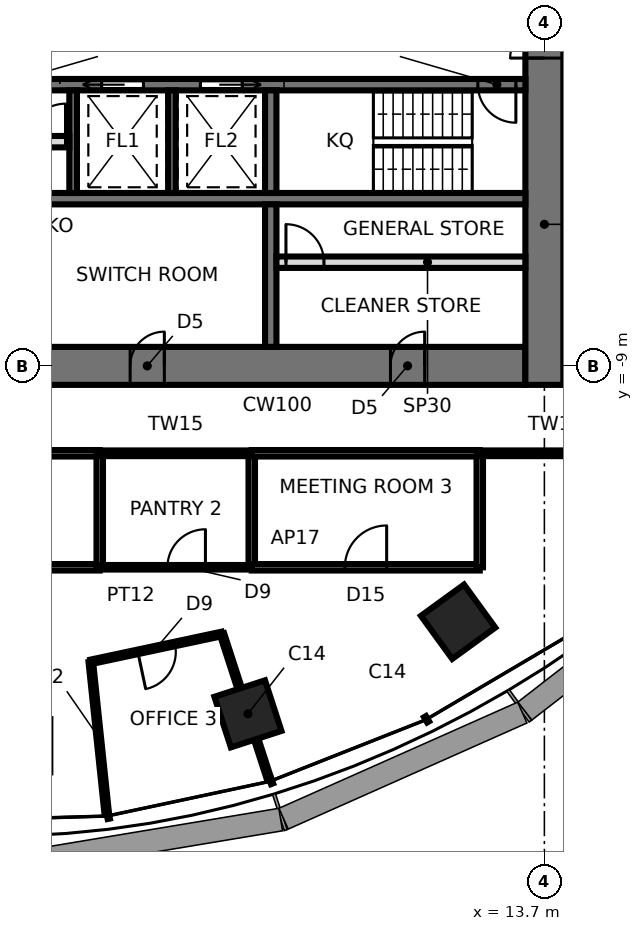
"""IFC4 building model, lengths in metres.
Left out: names, types, materials, properties, quantities, classifications, styles, units other than length and angle.
Written with IfcOpenShell. Run it as: python <this file> out.ifc"""

import sys

from ifc_helpers import new_model, si_unit, direction, frame, frame_2d, origin, origin_2d, place, context, subcontext, project, spatial, rectangle, extrude, element, fill, save


model = new_model("IFC4")
c1 = context("Model", 3, precision=1e-05, world=origin(), true_north=direction((0.0, 1.0)))
c2 = subcontext(c1, "Body", "Model", "MODEL_VIEW")
j1 = project(units=[si_unit("LENGTHUNIT", "METRE"), si_unit("PLANEANGLEUNIT", "RADIAN")], contexts=[c1])
p1 = place(None, origin())
s1 = spatial("IfcSite", under=j1, at=p1, CompositionType="ELEMENT")
p2 = place(p1, origin())
s2 = spatial("IfcBuilding", under=s1, at=p2, CompositionType="ELEMENT")
p3 = place(p2, frame((0.0, 0.0, 226.7)))
s3 = spatial("IfcBuildingStorey", under=s2, at=p3, CompositionType="ELEMENT", Elevation=226.7)
for number, where, z_axis, x_axis in (
    (1, (5.9, -18.157, 0.0), (0.0, 0.0, 1.0), (0.309, -0.951, 0.0)),
    (2, (11.43, -15.733, 0.0), (0.0, 0.0, 1.0), (0.588, -0.809, 0.0)),
):
    element("IfcColumn", number, at=place(p3, frame(where, z_axis=z_axis, x_axis=x_axis)), inside=s3, PredefinedType="COLUMN", context=c2, shape_type="SweptSolid", body=[
        extrude(rectangle(XDim=1.4, YDim=1.4, at=origin_2d()), origin(), (0.0, 0.0, 1.0), 3.9),
    ])
p4 = place(p3, frame((-13.2, -9.0, 0.0), z_axis=(0.0, 0.0, 1.0), x_axis=(1.0, 0.0, 0.0)))
e3 = element("IfcWall", 3, at=p4, inside=s3, PredefinedType="SHEAR", context=c2, shape_type="SweptSolid", body=[
    extrude(rectangle(XDim=26.4, YDim=1.0, at=frame_2d((13.2, 0.0))), origin(), (0.0, 0.0, 1.0), 3.9),
])
p5 = place(p4, frame((2.65, 0.0, 0.0)))
e4 = element("IfcOpeningElement", 4, at=p5, cuts=e3, PredefinedType="OPENING", context=c2, shape_type="SweptSolid", body=[
    extrude(rectangle(XDim=0.9, YDim=2.1, at=frame_2d((0.45, 1.05))), frame((0.0, 0.51, 0.0), z_axis=(0.0, -1.0, 0.0), x_axis=(1.0, 0.0, 0.0)), (0.0, 0.0, 1.0), 1.02),
])
p6 = place(p4, frame((9.5, 0.0, 0.0)))
e5 = element("IfcOpeningElement", 5, at=p6, cuts=e3, PredefinedType="OPENING", context=c2, shape_type="SweptSolid", body=[
    extrude(rectangle(XDim=0.9, YDim=2.1, at=frame_2d((0.45, 1.05))), frame((0.0, 0.51, 0.0), z_axis=(0.0, -1.0, 0.0), x_axis=(1.0, 0.0, 0.0)), (0.0, 0.0, 1.0), 1.02),
])
p7 = place(p4, frame((16.0, 0.0, 0.0)))
e6 = element("IfcOpeningElement", 6, at=p7, cuts=e3, PredefinedType="OPENING", context=c2, shape_type="SweptSolid", body=[
    extrude(rectangle(XDim=0.9, YDim=2.1, at=frame_2d((0.45, 1.05))), frame((0.0, 0.51, 0.0), z_axis=(0.0, -1.0, 0.0), x_axis=(1.0, 0.0, 0.0)), (0.0, 0.0, 1.0), 1.02),
])
p8 = place(p4, frame((22.85, 0.0, 0.0)))
e7 = element("IfcOpeningElement", 7, at=p8, cuts=e3, PredefinedType="OPENING", context=c2, shape_type="SweptSolid", body=[
    extrude(rectangle(XDim=0.9, YDim=2.1, at=frame_2d((0.45, 1.05))), frame((0.0, 0.51, 0.0), z_axis=(0.0, -1.0, 0.0), x_axis=(1.0, 0.0, 0.0)), (0.0, 0.0, 1.0), 1.02),
])
p9 = place(p3, frame((13.7, -9.5, 0.0), z_axis=(0.0, 0.0, 1.0), x_axis=(0.0, 1.0, 0.0)))
e8 = element("IfcWall", 8, at=p9, inside=s3, PredefinedType="SHEAR", context=c2, shape_type="SweptSolid", body=[
    extrude(rectangle(XDim=19.0, YDim=1.0, at=frame_2d((9.5, 0.0))), origin(), (0.0, 0.0, 1.0), 3.9),
])
p10 = place(p9, frame((8.6, 0.0, 0.0)))
e9 = element("IfcOpeningElement", 9, at=p10, cuts=e8, PredefinedType="OPENING", context=c2, shape_type="SweptSolid", body=[
    extrude(rectangle(XDim=1.8, YDim=2.4, at=frame_2d((0.9, 1.2))), frame((0.0, 0.51, 0.0), z_axis=(0.0, -1.0, 0.0), x_axis=(1.0, 0.0, 0.0)), (0.0, 0.0, 1.0), 1.02),
])
p11 = place(p3, frame((-13.2, -1.6, 0.0), z_axis=(0.0, 0.0, 1.0), x_axis=(1.0, 0.0, 0.0)))
e10 = element("IfcWall", 10, at=p11, inside=s3, PredefinedType="SHEAR", context=c2, shape_type="SweptSolid", body=[
    extrude(rectangle(XDim=26.4, YDim=0.3, at=frame_2d((13.2, 0.0))), origin(), (0.0, 0.0, 1.0), 3.9),
])
p12 = place(p11, frame((25.15, 0.0, 0.0)))
e11 = element("IfcOpeningElement", 11, at=p12, cuts=e10, PredefinedType="OPENING", context=c2, shape_type="SweptSolid", body=[
    extrude(rectangle(XDim=1.0, YDim=2.1, at=frame_2d((0.5, 1.05))), frame((0.0, 0.16, 0.0), z_axis=(0.0, -1.0, 0.0), x_axis=(1.0, 0.0, 0.0)), (0.0, 0.0, 1.0), 0.32),
])
p13 = place(p11, frame((6.95, 0.0, 0.0)))
e12 = element("IfcOpeningElement", 12, at=p13, cuts=e10, PredefinedType="OPENING", context=c2, shape_type="SweptSolid", body=[
    extrude(rectangle(XDim=0.9, YDim=2.1, at=frame_2d((0.45, 1.05))), frame((0.0, 0.16, 0.0), z_axis=(0.0, -1.0, 0.0), x_axis=(1.0, 0.0, 0.0)), (0.0, 0.0, 1.0), 0.32),
])
p14 = place(p11, frame((10.15, 0.0, 0.0)))
e13 = element("IfcOpeningElement", 13, at=p14, cuts=e10, PredefinedType="OPENING", context=c2, shape_type="SweptSolid", body=[
    extrude(rectangle(XDim=0.9, YDim=2.1, at=frame_2d((0.45, 1.05))), frame((0.0, 0.16, 0.0), z_axis=(0.0, -1.0, 0.0), x_axis=(1.0, 0.0, 0.0)), (0.0, 0.0, 1.0), 0.32),
])
p15 = place(p11, frame((12.15, 0.0, 0.0)))
e14 = element("IfcOpeningElement", 14, at=p15, cuts=e10, PredefinedType="OPENING", context=c2, shape_type="SweptSolid", body=[
    extrude(rectangle(XDim=0.9, YDim=2.1, at=frame_2d((0.45, 1.05))), frame((0.0, 0.16, 0.0), z_axis=(0.0, -1.0, 0.0), x_axis=(1.0, 0.0, 0.0)), (0.0, 0.0, 1.0), 0.32),
])
p16 = place(p11, frame((15.25, 0.0, 0.0)))
e15 = element("IfcOpeningElement", 15, at=p16, cuts=e10, PredefinedType="OPENING", context=c2, shape_type="SweptSolid", body=[
    extrude(rectangle(XDim=1.1, YDim=2.3, at=frame_2d((0.55, 1.15))), frame((0.0, 0.16, 0.0), z_axis=(0.0, -1.0, 0.0), x_axis=(1.0, 0.0, 0.0)), (0.0, 0.0, 1.0), 0.32),
])
p17 = place(p11, frame((17.85, 0.0, 0.0)))
e16 = element("IfcOpeningElement", 16, at=p17, cuts=e10, PredefinedType="OPENING", context=c2, shape_type="SweptSolid", body=[
    extrude(rectangle(XDim=1.1, YDim=2.3, at=frame_2d((0.55, 1.15))), frame((0.0, 0.16, 0.0), z_axis=(0.0, -1.0, 0.0), x_axis=(1.0, 0.0, 0.0)), (0.0, 0.0, 1.0), 0.32),
])
p18 = place(p11, frame((4.85, 0.0, 0.0)))
e17 = element("IfcOpeningElement", 17, at=p18, cuts=e10, PredefinedType="OPENING", context=c2, shape_type="SweptSolid", body=[
    extrude(rectangle(XDim=1.1, YDim=2.3, at=frame_2d((0.55, 1.15))), frame((0.0, 0.16, 0.0), z_axis=(0.0, -1.0, 0.0), x_axis=(1.0, 0.0, 0.0)), (0.0, 0.0, 1.0), 0.32),
])
p19 = place(p11, frame((2.25, 0.0, 0.0)))
e18 = element("IfcOpeningElement", 18, at=p19, cuts=e10, PredefinedType="OPENING", context=c2, shape_type="SweptSolid", body=[
    extrude(rectangle(XDim=1.1, YDim=2.3, at=frame_2d((0.55, 1.15))), frame((0.0, 0.16, 0.0), z_axis=(0.0, -1.0, 0.0), x_axis=(1.0, 0.0, 0.0)), (0.0, 0.0, 1.0), 0.32),
])
p20 = place(p11, frame((0.35, 0.0, 0.0)))
e19 = element("IfcOpeningElement", 19, at=p20, cuts=e10, PredefinedType="OPENING", context=c2, shape_type="SweptSolid", body=[
    extrude(rectangle(XDim=0.9, YDim=2.1, at=frame_2d((0.45, 1.05))), frame((0.0, 0.16, 0.0), z_axis=(0.0, -1.0, 0.0), x_axis=(1.0, 0.0, 0.0)), (0.0, 0.0, 1.0), 0.32),
])
p21 = place(p3, frame((-13.2, -4.6, 0.0), z_axis=(0.0, 0.0, 1.0), x_axis=(1.0, 0.0, 0.0)))
e20 = element("IfcWall", 20, at=p21, inside=s3, PredefinedType="SHEAR", context=c2, shape_type="SweptSolid", body=[
    extrude(rectangle(XDim=26.4, YDim=0.3, at=frame_2d((13.2, 0.0))), origin(), (0.0, 0.0, 1.0), 3.9),
])
p22 = place(p3, frame((6.5, -1.75, 0.0), z_axis=(0.0, 0.0, 1.0), x_axis=(0.0, -1.0, 0.0)))
e21 = element("IfcWall", 21, at=p22, inside=s3, PredefinedType="SHEAR", context=c2, shape_type="SweptSolid", body=[
    extrude(rectangle(XDim=2.7, YDim=0.3, at=frame_2d((1.35, 0.0))), origin(), (0.0, 0.0, 1.0), 3.9),
])
p23 = place(p3, frame((6.5, -4.75, 0.0), z_axis=(0.0, 0.0, 1.0), x_axis=(0.0, -1.0, 0.0)))
e22 = element("IfcWall", 22, at=p23, inside=s3, PredefinedType="SHEAR", context=c2, shape_type="SweptSolid", body=[
    extrude(rectangle(XDim=3.75, YDim=0.3, at=frame_2d((1.875, 0.0))), origin(), (0.0, 0.0, 1.0), 3.9),
])
for number, where, z_axis, x_axis in (
    (23, (1.3, -1.75, 0.0), (0.0, 0.0, 1.0), (0.0, -1.0, 0.0)),
    (24, (3.9, -1.75, 0.0), (0.0, 0.0, 1.0), (0.0, -1.0, 0.0)),
):
    element("IfcWall", number, at=place(p3, frame(where, z_axis=z_axis, x_axis=x_axis)), inside=s3, PredefinedType="SHEAR", context=c2, shape_type="SweptSolid", body=[
        extrude(rectangle(XDim=2.7, YDim=0.2, at=frame_2d((1.35, 0.0))), origin(), (0.0, 0.0, 1.0), 3.9),
    ])
p24 = place(p3, frame((-1.2, -3.1, 0.0), z_axis=(0.0, 0.0, 1.0), x_axis=(1.0, 0.0, 0.0)))
e25 = element("IfcWall", 25, at=p24, inside=s3, PredefinedType="PARTITIONING", context=c2, shape_type="SweptSolid", body=[
    extrude(rectangle(XDim=2.4, YDim=0.3, at=frame_2d((1.2, 0.0))), origin(), (0.0, 0.0, 1.0), 3.74),
])
p25 = place(p24, frame((1.3, 0.0, 0.0)))
e26 = element("IfcOpeningElement", 26, at=p25, cuts=e25, PredefinedType="OPENING", context=c2, shape_type="SweptSolid", body=[
    extrude(rectangle(XDim=1.0, YDim=2.4, at=frame_2d((0.5, 1.2))), frame((0.0, 0.16, 0.0), z_axis=(0.0, -1.0, 0.0), x_axis=(1.0, 0.0, 0.0)), (0.0, 0.0, 1.0), 0.32),
])
p26 = place(p3, frame((6.65, -6.272, 0.0), z_axis=(0.0, 0.0, 1.0), x_axis=(1.0, 0.0, 0.0)))
e27 = element("IfcWall", 27, at=p26, inside=s3, PredefinedType="PARTITIONING", context=c2, shape_type="SweptSolid", body=[
    extrude(rectangle(XDim=6.55, YDim=0.3, at=frame_2d((3.275, 0.0))), origin(), (0.0, 0.0, 1.0), 3.74),
])
p27 = place(p26, frame((0.25, 0.0, 0.0)))
e28 = element("IfcOpeningElement", 28, at=p27, cuts=e27, PredefinedType="OPENING", context=c2, shape_type="SweptSolid", body=[
    extrude(rectangle(XDim=1.0, YDim=2.4, at=frame_2d((0.5, 1.2))), frame((0.0, 0.16, 0.0), z_axis=(0.0, -1.0, 0.0), x_axis=(1.0, 0.0, 0.0)), (0.0, 0.0, 1.0), 0.32),
])
p28 = place(p3, frame((2.0, -11.3, 0.0), z_axis=(0.0, 0.0, 1.0), x_axis=(-1.0, 0.0, 0.0)))
e29 = element("IfcWall", 29, at=p28, inside=s3, PredefinedType="PARTITIONING", context=c2, shape_type="SweptSolid", body=[
    extrude(rectangle(XDim=8.0, YDim=0.17, at=frame_2d((4.0, 0.0))), origin(), (0.0, 0.0, 1.0), 3.74),
])
p29 = place(p3, frame((-6.0, -14.3, 0.0), z_axis=(0.0, 0.0, 1.0), x_axis=(1.0, 0.0, 0.0)))
e30 = element("IfcWall", 30, at=p29, inside=s3, PredefinedType="PARTITIONING", context=c2, shape_type="SweptSolid", body=[
    extrude(rectangle(XDim=8.0, YDim=0.17, at=frame_2d((4.0, 0.0))), origin(), (0.0, 0.0, 1.0), 3.74),
])
p30 = place(p29, frame((3.45, 0.0, 0.0)))
e31 = element("IfcOpeningElement", 31, at=p30, cuts=e30, PredefinedType="OPENING", context=c2, shape_type="SweptSolid", body=[
    extrude(rectangle(XDim=1.1, YDim=2.4, at=frame_2d((0.55, 1.2))), frame((0.0, 0.095, 0.0), z_axis=(0.0, -1.0, 0.0), x_axis=(1.0, 0.0, 0.0)), (0.0, 0.0, 1.0), 0.19),
])
p31 = place(p3, frame((1.765, -16.789, 0.0), z_axis=(0.0, 0.0, 1.0), x_axis=(0.104494148666, -0.99452550138, 0.0)))
e32 = element("IfcWall", 32, at=p31, inside=s3, PredefinedType="PARTITIONING", context=c2, shape_type="SweptSolid", body=[
    extrude(rectangle(XDim=4.0, YDim=0.12, at=frame_2d((2.0, 0.0))), origin(), (0.0, 0.0, 1.0), 3.74),
])
p32 = place(p3, frame((2.0, -11.3, 0.0), z_axis=(0.0, 0.0, 1.0), x_axis=(0.0, -1.0, 0.0)))
e33 = element("IfcWall", 33, at=p32, inside=s3, PredefinedType="PARTITIONING", context=c2, shape_type="SweptSolid", body=[
    extrude(rectangle(XDim=3.0, YDim=0.17, at=frame_2d((1.5, 0.0))), origin(), (0.0, 0.0, 1.0), 3.74),
])
p33 = place(p3, frame((5.216, -16.053, 0.0), z_axis=(0.0, 0.0, 1.0), x_axis=(-0.978033661385, -0.208447012927, 0.0)))
e34 = element("IfcWall", 34, at=p33, inside=s3, PredefinedType="PARTITIONING", context=c2, shape_type="SweptSolid", body=[
    extrude(rectangle(XDim=3.529, YDim=0.12, at=frame_2d((1.765, 0.0))), origin(), (0.0, 0.0, 1.0), 3.74),
])
p34 = place(p33, frame((1.264, 0.0, 0.0)))
e35 = element("IfcOpeningElement", 35, at=p34, cuts=e34, PredefinedType="OPENING", context=c2, shape_type="SweptSolid", body=[
    extrude(rectangle(XDim=1.0, YDim=2.4, at=frame_2d((0.5, 1.2))), frame((0.0, 0.07, 0.0), z_axis=(0.0, -1.0, 0.0), x_axis=(1.0, 0.0, 0.0)), (0.0, 0.0, 1.0), 0.14),
])
p35 = place(p3, frame((2.0, -14.3, 0.0), z_axis=(0.0, 0.0, 1.0), x_axis=(1.0, 0.0, 0.0)))
e36 = element("IfcWall", 36, at=p35, inside=s3, PredefinedType="PARTITIONING", context=c2, shape_type="SweptSolid", body=[
    extrude(rectangle(XDim=4.0, YDim=0.12, at=frame_2d((2.0, 0.0))), origin(), (0.0, 0.0, 1.0), 3.74),
])
p36 = place(p35, frame((1.781, 0.0, 0.0)))
e37 = element("IfcOpeningElement", 37, at=p36, cuts=e36, PredefinedType="OPENING", context=c2, shape_type="SweptSolid", body=[
    extrude(rectangle(XDim=1.0, YDim=2.4, at=frame_2d((0.5, 1.2))), frame((0.0, 0.07, 0.0), z_axis=(0.0, -1.0, 0.0), x_axis=(1.0, 0.0, 0.0)), (0.0, 0.0, 1.0), 0.14),
])
p37 = place(p3, frame((6.452, -19.857, 0.0), z_axis=(0.0, 0.0, 1.0), x_axis=(-0.309022586479, 0.951054699292, 0.0)))
e38 = element("IfcWall", 38, at=p37, inside=s3, PredefinedType="PARTITIONING", context=c2, shape_type="SweptSolid", body=[
    extrude(rectangle(XDim=4.0, YDim=0.12, at=frame_2d((2.0, 0.0))), origin(), (0.0, 0.0, 1.0), 3.04),
])
p38 = place(p3, frame((6.0, -11.3, 0.0), z_axis=(0.0, 0.0, 1.0), x_axis=(-1.0, 0.0, 0.0)))
e39 = element("IfcWall", 39, at=p38, inside=s3, PredefinedType="PARTITIONING", context=c2, shape_type="SweptSolid", body=[
    extrude(rectangle(XDim=4.0, YDim=0.15, at=frame_2d((2.0, 0.0))), origin(), (0.0, 0.0, 1.0), 3.74),
])
p39 = place(p3, frame((6.0, -11.3, 0.0), z_axis=(0.0, 0.0, 1.0), x_axis=(0.0, -1.0, 0.0)))
e40 = element("IfcWall", 40, at=p39, inside=s3, PredefinedType="PARTITIONING", context=c2, shape_type="SweptSolid", body=[
    extrude(rectangle(XDim=3.0, YDim=0.17, at=frame_2d((1.5, 0.0))), origin(), (0.0, 0.0, 1.0), 3.74),
])
p40 = place(p3, frame((6.0, -14.3, 0.0), z_axis=(0.0, 0.0, 1.0), x_axis=(1.0, 0.0, 0.0)))
e41 = element("IfcWall", 41, at=p40, inside=s3, PredefinedType="PARTITIONING", context=c2, shape_type="SweptSolid", body=[
    extrude(rectangle(XDim=6.0, YDim=0.17, at=frame_2d((3.0, 0.0))), origin(), (0.0, 0.0, 1.0), 3.74),
])
p41 = place(p40, frame((2.45, 0.0, 0.0)))
e42 = element("IfcOpeningElement", 42, at=p41, cuts=e41, PredefinedType="OPENING", context=c2, shape_type="SweptSolid", body=[
    extrude(rectangle(XDim=1.1, YDim=2.4, at=frame_2d((0.55, 1.2))), frame((0.0, 0.095, 0.0), z_axis=(0.0, -1.0, 0.0), x_axis=(1.0, 0.0, 0.0)), (0.0, 0.0, 1.0), 0.19),
])
p42 = place(p3, frame((12.0, -11.3, 0.0), z_axis=(0.0, 0.0, 1.0), x_axis=(-1.0, 0.0, 0.0)))
e43 = element("IfcWall", 43, at=p42, inside=s3, PredefinedType="PARTITIONING", context=c2, shape_type="SweptSolid", body=[
    extrude(rectangle(XDim=6.0, YDim=0.17, at=frame_2d((3.0, 0.0))), origin(), (0.0, 0.0, 1.0), 3.74),
])
p43 = place(p3, frame((12.0, -14.3, 0.0), z_axis=(0.0, 0.0, 1.0), x_axis=(0.0, 1.0, 0.0)))
e44 = element("IfcWall", 44, at=p43, inside=s3, PredefinedType="PARTITIONING", context=c2, shape_type="SweptSolid", body=[
    extrude(rectangle(XDim=3.0, YDim=0.17, at=frame_2d((1.5, 0.0))), origin(), (0.0, 0.0, 1.0), 3.74),
])
p44 = place(p3, frame((12.0, -11.3, 0.0), z_axis=(0.0, 0.0, 1.0), x_axis=(1.0, 0.0, 0.0)))
e45 = element("IfcWall", 45, at=p44, inside=s3, PredefinedType="PARTITIONING", context=c2, shape_type="SweptSolid", body=[
    extrude(rectangle(XDim=4.0, YDim=0.15, at=frame_2d((2.0, 0.0))), origin(), (0.0, 0.0, 1.0), 3.74),
])
p45 = place(p10, origin())
e46 = element("IfcDoor", 46, at=p45, inside=s3, OperationType="DOUBLE_DOOR_SINGLE_SWING", PredefinedType="DOOR", context=c2, shape_type="SweptSolid", body=[
    extrude(rectangle(XDim=1.72, YDim=2.36, at=frame_2d((0.9, 1.18))), frame((0.0, 0.025, 0.0), z_axis=(0.0, -1.0, 0.0), x_axis=(1.0, 0.0, 0.0)), (0.0, 0.0, 1.0), 0.05),
    extrude(rectangle(XDim=0.04, YDim=2.4, at=frame_2d((0.02, 1.2))), frame((0.0, 0.25, 0.0), z_axis=(0.0, -1.0, 0.0), x_axis=(1.0, 0.0, 0.0)), (0.0, 0.0, 1.0), 0.5),
    extrude(rectangle(XDim=0.04, YDim=2.4, at=frame_2d((1.78, 1.2))), frame((0.0, 0.25, 0.0), z_axis=(0.0, -1.0, 0.0), x_axis=(1.0, 0.0, 0.0)), (0.0, 0.0, 1.0), 0.5),
    extrude(rectangle(XDim=1.72, YDim=0.04, at=frame_2d((0.9, 2.38))), frame((0.0, 0.25, 0.0), z_axis=(0.0, -1.0, 0.0), x_axis=(1.0, 0.0, 0.0)), (0.0, 0.0, 1.0), 0.5),
])
fill(e9, e46)
p46 = place(p12, frame((1.0, 0.0, 0.0), z_axis=(0.0, 0.0, 1.0), x_axis=(-1.0, 0.0, 0.0)))
e47 = element("IfcDoor", 47, at=p46, inside=s3, OperationType="SINGLE_SWING_LEFT", PredefinedType="DOOR", context=c2, shape_type="SweptSolid", body=[
    extrude(rectangle(XDim=1.0, YDim=2.1, at=frame_2d((0.5, 1.05))), frame((0.0, 0.025, 0.0), z_axis=(0.0, -1.0, 0.0), x_axis=(1.0, 0.0, 0.0)), (0.0, 0.0, 1.0), 0.05),
])
fill(e11, e47)
p47 = place(p25, origin())
e48 = element("IfcDoor", 48, at=p47, inside=s3, OperationType="SINGLE_SWING_RIGHT", PredefinedType="DOOR", context=c2, shape_type="SweptSolid", body=[
    extrude(rectangle(XDim=1.0, YDim=2.4, at=frame_2d((0.5, 1.2))), frame((0.0, 0.025, 0.0), z_axis=(0.0, -1.0, 0.0), x_axis=(1.0, 0.0, 0.0)), (0.0, 0.0, 1.0), 0.05),
])
fill(e26, e48)
p48 = place(p16, frame((1.1, 0.0, 0.0), z_axis=(0.0, 0.0, 1.0), x_axis=(-1.0, 0.0, 0.0)))
e49 = element("IfcDoor", 49, at=p48, inside=s3, OperationType="SLIDING_TO_RIGHT", PredefinedType="DOOR", context=c2, shape_type="SweptSolid", body=[
    extrude(rectangle(XDim=1.1, YDim=2.3, at=frame_2d((0.55, 1.15))), frame((0.0, 0.025, 0.0), z_axis=(0.0, -1.0, 0.0), x_axis=(1.0, 0.0, 0.0)), (0.0, 0.0, 1.0), 0.05),
])
fill(e15, e49)
p49 = place(p17, frame((1.1, 0.0, 0.0), z_axis=(0.0, 0.0, 1.0), x_axis=(-1.0, 0.0, 0.0)))
e50 = element("IfcDoor", 50, at=p49, inside=s3, OperationType="SLIDING_TO_LEFT", PredefinedType="DOOR", context=c2, shape_type="SweptSolid", body=[
    extrude(rectangle(XDim=1.1, YDim=2.3, at=frame_2d((0.55, 1.15))), frame((0.0, 0.025, 0.0), z_axis=(0.0, -1.0, 0.0), x_axis=(1.0, 0.0, 0.0)), (0.0, 0.0, 1.0), 0.05),
])
fill(e16, e50)
p50 = place(p7, origin())
e51 = element("IfcDoor", 51, at=p50, inside=s3, OperationType="SINGLE_SWING_RIGHT", PredefinedType="DOOR", context=c2, shape_type="SweptSolid", body=[
    extrude(rectangle(XDim=0.82, YDim=2.06, at=frame_2d((0.45, 1.03))), frame((0.0, 0.025, 0.0), z_axis=(0.0, -1.0, 0.0), x_axis=(1.0, 0.0, 0.0)), (0.0, 0.0, 1.0), 0.05),
    extrude(rectangle(XDim=0.04, YDim=2.1, at=frame_2d((0.02, 1.05))), frame((0.0, 0.25, 0.0), z_axis=(0.0, -1.0, 0.0), x_axis=(1.0, 0.0, 0.0)), (0.0, 0.0, 1.0), 0.5),
    extrude(rectangle(XDim=0.04, YDim=2.1, at=frame_2d((0.88, 1.05))), frame((0.0, 0.25, 0.0), z_axis=(0.0, -1.0, 0.0), x_axis=(1.0, 0.0, 0.0)), (0.0, 0.0, 1.0), 0.5),
    extrude(rectangle(XDim=0.82, YDim=0.04, at=frame_2d((0.45, 2.08))), frame((0.0, 0.25, 0.0), z_axis=(0.0, -1.0, 0.0), x_axis=(1.0, 0.0, 0.0)), (0.0, 0.0, 1.0), 0.5),
])
fill(e6, e51)
p51 = place(p8, origin())
e52 = element("IfcDoor", 52, at=p51, inside=s3, OperationType="SINGLE_SWING_RIGHT", PredefinedType="DOOR", context=c2, shape_type="SweptSolid", body=[
    extrude(rectangle(XDim=0.82, YDim=2.06, at=frame_2d((0.45, 1.03))), frame((0.0, 0.025, 0.0), z_axis=(0.0, -1.0, 0.0), x_axis=(1.0, 0.0, 0.0)), (0.0, 0.0, 1.0), 0.05),
    extrude(rectangle(XDim=0.04, YDim=2.1, at=frame_2d((0.02, 1.05))), frame((0.0, 0.25, 0.0), z_axis=(0.0, -1.0, 0.0), x_axis=(1.0, 0.0, 0.0)), (0.0, 0.0, 1.0), 0.5),
    extrude(rectangle(XDim=0.04, YDim=2.1, at=frame_2d((0.88, 1.05))), frame((0.0, 0.25, 0.0), z_axis=(0.0, -1.0, 0.0), x_axis=(1.0, 0.0, 0.0)), (0.0, 0.0, 1.0), 0.5),
    extrude(rectangle(XDim=0.82, YDim=0.04, at=frame_2d((0.45, 2.08))), frame((0.0, 0.25, 0.0), z_axis=(0.0, -1.0, 0.0), x_axis=(1.0, 0.0, 0.0)), (0.0, 0.0, 1.0), 0.5),
])
fill(e7, e52)
p52 = place(p27, origin())
e53 = element("IfcDoor", 53, at=p52, inside=s3, OperationType="SINGLE_SWING_LEFT", PredefinedType="DOOR", context=c2, shape_type="SweptSolid", body=[
    extrude(rectangle(XDim=1.0, YDim=2.4, at=frame_2d((0.5, 1.2))), frame((0.0, 0.025, 0.0), z_axis=(0.0, -1.0, 0.0), x_axis=(1.0, 0.0, 0.0)), (0.0, 0.0, 1.0), 0.05),
])
fill(e28, e53)
p53 = place(p34, origin())
e54 = element("IfcDoor", 54, at=p53, inside=s3, OperationType="SINGLE_SWING_RIGHT", PredefinedType="DOOR", context=c2, shape_type="SweptSolid", body=[
    extrude(rectangle(XDim=1.0, YDim=2.4, at=frame_2d((0.5, 1.2))), frame((0.0, 0.025, 0.0), z_axis=(0.0, -1.0, 0.0), x_axis=(1.0, 0.0, 0.0)), (0.0, 0.0, 1.0), 0.05),
])
fill(e35, e54)
p54 = place(p36, origin())
e55 = element("IfcDoor", 55, at=p54, inside=s3, OperationType="SINGLE_SWING_RIGHT", PredefinedType="DOOR", context=c2, shape_type="SweptSolid", body=[
    extrude(rectangle(XDim=1.0, YDim=2.4, at=frame_2d((0.5, 1.2))), frame((0.0, 0.025, 0.0), z_axis=(0.0, -1.0, 0.0), x_axis=(1.0, 0.0, 0.0)), (0.0, 0.0, 1.0), 0.05),
])
fill(e37, e55)
p55 = place(p41, origin())
e56 = element("IfcDoor", 56, at=p55, inside=s3, OperationType="SINGLE_SWING_RIGHT", PredefinedType="DOOR", context=c2, shape_type="SweptSolid", body=[
    extrude(rectangle(XDim=1.1, YDim=2.4, at=frame_2d((0.55, 1.2))), frame((0.0, 0.025, 0.0), z_axis=(0.0, -1.0, 0.0), x_axis=(1.0, 0.0, 0.0)), (0.0, 0.0, 1.0), 0.05),
])
fill(e42, e56)
save(model, sys.argv[1])
